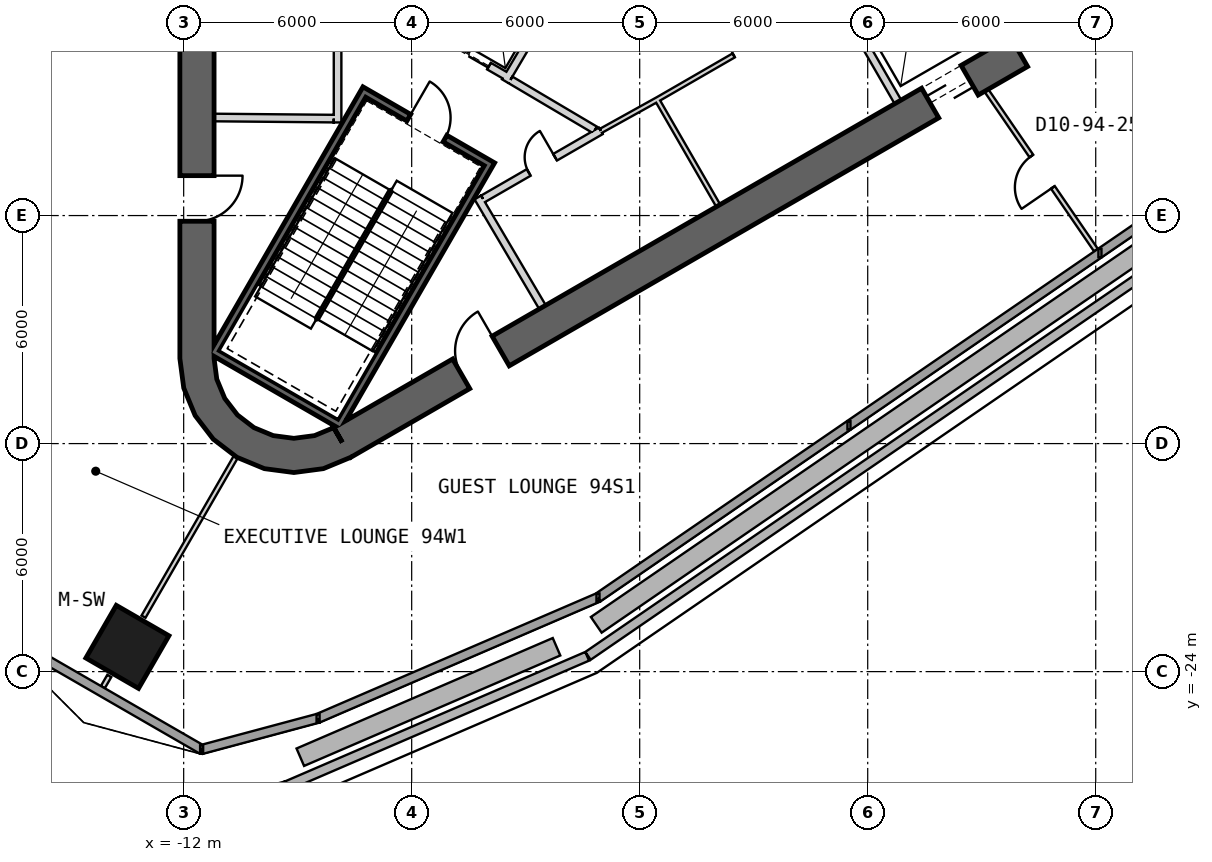
"""IFC4 building model, lengths in metres.
Left out: names, types, materials, properties, quantities, classifications, styles, units other than length and angle.
Written with IfcOpenShell. Run it as: python <this file> out.ifc"""

import sys

from ifc_helpers import new_model, si_unit, direction, frame, frame_2d, origin, origin_2d, place, context, subcontext, project, spatial, polyline, rectangle, outline, extrude, element, fill, save


model = new_model("IFC4")
c1 = context("Model", 3, precision=1e-05, world=origin(), true_north=direction((0.0, 1.0)))
c2 = subcontext(c1, "Body", "Model", "MODEL_VIEW")
j1 = project(units=[si_unit("LENGTHUNIT", "METRE"), si_unit("PLANEANGLEUNIT", "RADIAN")], contexts=[c1])
p1 = place(None, origin())
s1 = spatial("IfcSite", under=j1, at=p1, CompositionType="ELEMENT")
p2 = place(p1, origin())
s2 = spatial("IfcBuilding", under=s1, at=p2, CompositionType="ELEMENT")
p3 = place(p2, frame((0.0, 0.0, 415.3)))
s3 = spatial("IfcBuildingStorey", under=s2, at=p3, CompositionType="ELEMENT", Elevation=415.3)
p4 = place(p3, frame((-13.48, -23.349, -0.25), z_axis=(0.0, 0.0, 1.0), x_axis=(-0.5, -0.866025403784, 0.0)))
e1 = element("IfcColumn", 1, at=p4, inside=s3, PredefinedType="COLUMN", context=c2, shape_type="SweptSolid", body=[
    extrude(rectangle(XDim=1.6, YDim=1.6, at=origin_2d()), origin(), (0.0, 0.0, 1.0), 5.0),
])
p5 = place(p3, frame((-11.65, 15.762, 0.0), z_axis=(0.0, 0.0, 1.0), x_axis=(0.0, -1.0, 0.0)))
e2 = element("IfcWall", 2, at=p5, inside=s3, PredefinedType="SHEAR", context=c2, shape_type="SweptSolid", body=[
    extrude(rectangle(XDim=31.523, YDim=0.9, at=frame_2d((15.762, 0.0))), origin(), (0.0, 0.0, 1.0), 5.0),
])
p6 = place(p5, frame((3.612, 0.0, 0.0)))
e3 = element("IfcOpeningElement", 3, at=p6, cuts=e2, PredefinedType="OPENING", context=c2, shape_type="SweptSolid", body=[
    extrude(rectangle(XDim=1.2, YDim=2.4, at=frame_2d((0.6, 1.2))), frame((0.0, 0.46, 0.0), z_axis=(0.0, -1.0, 0.0), x_axis=(1.0, 0.0, 0.0)), (0.0, 0.0, 1.0), 0.92),
])
p7 = place(p5, frame((26.712, 0.0, 0.0)))
e4 = element("IfcOpeningElement", 4, at=p7, cuts=e2, PredefinedType="OPENING", context=c2, shape_type="SweptSolid", body=[
    extrude(rectangle(XDim=1.2, YDim=2.4, at=frame_2d((0.6, 1.2))), frame((0.0, 0.46, 0.0), z_axis=(0.0, -1.0, 0.0), x_axis=(1.0, 0.0, 0.0)), (0.0, 0.0, 1.0), 0.92),
])
p8 = place(p3, frame((-7.825, -17.97, 0.0), z_axis=(0.0, 0.0, 1.0), x_axis=(0.866028369851, 0.499994862586, 0.0)))
e5 = element("IfcWall", 5, at=p8, inside=s3, PredefinedType="SHEAR", context=c2, shape_type="SweptSolid", body=[
    extrude(rectangle(XDim=31.523, YDim=0.9, at=frame_2d((15.762, 0.0))), origin(), (0.0, 0.0, 1.0), 5.0),
])
p9 = place(p8, frame((17.862, 0.0, 0.0)))
e6 = element("IfcOpeningElement", 6, at=p9, cuts=e5, PredefinedType="OPENING", context=c2, shape_type="SweptSolid", body=[
    extrude(rectangle(XDim=1.2, YDim=2.4, at=frame_2d((0.6, 1.2))), frame((0.0, 0.46, 0.0), z_axis=(0.0, -1.0, 0.0), x_axis=(1.0, 0.0, 0.0)), (0.0, 0.0, 1.0), 0.92),
])
p10 = place(p8, frame((20.562, 0.0, 0.0)))
e7 = element("IfcOpeningElement", 7, at=p10, cuts=e5, PredefinedType="OPENING", context=c2, shape_type="SweptSolid", body=[
    extrude(rectangle(XDim=1.2, YDim=2.4, at=frame_2d((0.6, 1.2))), frame((0.0, 0.46, 0.0), z_axis=(0.0, -1.0, 0.0), x_axis=(1.0, 0.0, 0.0)), (0.0, 0.0, 1.0), 0.92),
])
p11 = place(p8, frame((26.712, 0.0, 0.0)))
e8 = element("IfcOpeningElement", 8, at=p11, cuts=e5, PredefinedType="OPENING", context=c2, shape_type="SweptSolid", body=[
    extrude(rectangle(XDim=1.2, YDim=2.4, at=frame_2d((0.6, 1.2))), frame((0.0, 0.46, 0.0), z_axis=(0.0, -1.0, 0.0), x_axis=(1.0, 0.0, 0.0)), (0.0, 0.0, 1.0), 0.92),
])
p12 = place(p8, frame((3.612, 0.0, 0.0)))
e9 = element("IfcOpeningElement", 9, at=p12, cuts=e5, PredefinedType="OPENING", context=c2, shape_type="SweptSolid", body=[
    extrude(rectangle(XDim=1.2, YDim=2.4, at=frame_2d((0.6, 1.2))), frame((0.0, 0.46, 0.0), z_axis=(0.0, -1.0, 0.0), x_axis=(1.0, 0.0, 0.0)), (0.0, 0.0, 1.0), 0.92),
])
p13 = place(p3, origin())
e10 = element("IfcWall", 10, at=p13, inside=s3, PredefinedType="SHEAR", context=c2, shape_type="SweptSolid", body=[
    extrude(outline(polyline([(-12.1, -15.762), (-11.998, -16.538), (-11.698, -17.262), (-11.221, -17.883), (-10.6, -18.36), (-9.876, -18.659), (-9.1, -18.762), (-8.323, -18.659), (-7.6, -18.36), (-8.05, -17.58), (-8.556, -17.79), (-9.1, -17.862), (-9.644, -17.79), (-10.15, -17.58), (-10.585, -17.247), (-10.919, -16.812), (-11.128, -16.305), (-11.2, -15.762), (-12.1, -15.762)])), origin(), (0.0, 0.0, 1.0), 5.0),
])
p14 = place(p3, frame((-16.795, -23.007, 0.0), z_axis=(0.0, 0.0, 1.0), x_axis=(0.866033863416, -0.499985347202, 0.0)))
e11 = element("IfcWall", 11, at=p14, inside=s3, PredefinedType="SOLIDWALL", context=c2, shape_type="SweptSolid", body=[
    extrude(rectangle(XDim=6.083, YDim=0.24, at=frame_2d((3.042, 0.0))), origin(), (0.0, 0.0, 1.0), 4.75),
])
p15 = place(p3, frame((-11.527, -26.048, 0.0), z_axis=(0.0, 0.0, 1.0), x_axis=(0.965940494045, 0.258764298086, 0.0)))
e12 = element("IfcWall", 12, at=p15, inside=s3, PredefinedType="SOLIDWALL", context=c2, shape_type="SweptSolid", body=[
    extrude(rectangle(XDim=3.172, YDim=0.24, at=frame_2d((1.586, 0.0))), origin(), (0.0, 0.0, 1.0), 4.75),
])
p16 = place(p3, frame((-8.463, -25.227, 0.0), z_axis=(0.0, 0.0, 1.0), x_axis=(0.918306915917, 0.395869180638, 0.0)))
e13 = element("IfcWall", 13, at=p16, inside=s3, PredefinedType="SOLIDWALL", context=c2, shape_type="SweptSolid", body=[
    extrude(rectangle(XDim=8.021, YDim=0.24, at=frame_2d((4.01, 0.0))), origin(), (0.0, 0.0, 1.0), 4.75),
])
p17 = place(p3, frame((-1.098, -22.052, 0.0), z_axis=(0.0, 0.0, 1.0), x_axis=(0.824476827337, 0.565895715821, 0.0)))
e14 = element("IfcWall", 14, at=p17, inside=s3, PredefinedType="SOLIDWALL", context=c2, shape_type="SweptSolid", body=[
    extrude(rectangle(XDim=24.031, YDim=0.24, at=frame_2d((12.016, 0.0))), origin(), (0.0, 0.0, 1.0), 4.75),
])
p18 = place(p3, frame((20.109, -8.849, 0.04), z_axis=(0.0, 0.0, 1.0), x_axis=(-0.824476642241, -0.565895985494, 0.0)))
e15 = element("IfcWall", 15, at=p18, inside=s3, PredefinedType="PARAPET", context=c2, shape_type="SweptSolid", body=[
    extrude(rectangle(XDim=26.04, YDim=0.25, at=frame_2d((13.02, 0.0))), origin(), (0.0, 0.0, 1.0), 1.2),
])
p19 = place(p3, frame((-1.382, -23.597, 0.04), z_axis=(0.0, 0.0, 1.0), x_axis=(-0.918307389255, -0.395868082622, 0.0)))
e16 = element("IfcWall", 16, at=p19, inside=s3, PredefinedType="PARAPET", context=c2, shape_type="SweptSolid", body=[
    extrude(rectangle(XDim=8.614, YDim=0.25, at=frame_2d((4.307, 0.0))), origin(), (0.0, 0.0, 1.0), 1.2),
])
p20 = place(p3, frame((-9.31, -27.013, 0.04), z_axis=(0.0, 0.0, 1.0), x_axis=(-0.965913407004, -0.258865390057, 0.0)))
e17 = element("IfcWall", 17, at=p20, inside=s3, PredefinedType="PARAPET", context=c2, shape_type="SweptSolid", body=[
    extrude(rectangle(XDim=3.272, YDim=0.25, at=frame_2d((1.636, 0.0))), origin(), (0.0, 0.0, 1.0), 1.2),
])
p21 = place(p3, frame((19.357, -8.698, 0.04), z_axis=(0.0, 0.0, 1.0), x_axis=(-0.824477152259, -0.565895242428, 0.0)))
e18 = element("IfcWall", 18, at=p21, inside=s3, PredefinedType="PARAPET", context=c2, shape_type="SweptSolid", body=[
    extrude(rectangle(XDim=24.864, YDim=0.5, at=frame_2d((12.432, 0.0))), origin(), (0.0, 0.0, 1.0), 0.6),
])
p22 = place(p3, frame((-2.188, -23.346, 0.04), z_axis=(0.0, 0.0, 1.0), x_axis=(-0.918305329137, -0.395872861507, 0.0)))
e19 = element("IfcWall", 19, at=p22, inside=s3, PredefinedType="PARAPET", context=c2, shape_type="SweptSolid", body=[
    extrude(rectangle(XDim=7.342, YDim=0.5, at=frame_2d((3.671, 0.0))), origin(), (0.0, 0.0, 1.0), 0.6),
])
p23 = place(p3, frame((6.795, -9.01, 0.0), z_axis=(0.0, 0.0, 1.0), x_axis=(-0.499984717929, 0.866034226713, 0.0)))
e20 = element("IfcWall", 20, at=p23, inside=s3, PredefinedType="PLUMBINGWALL", context=c2, shape_type="SweptSolid", body=[
    extrude(rectangle(XDim=3.25, YDim=0.2, at=frame_2d((1.625, 0.0))), origin(), (0.0, 0.0, 1.0), 4.75),
])
p24 = place(p3, frame((-3.905, -10.563, -0.25), z_axis=(0.0, 0.0, 1.0), x_axis=(-0.500012932018, -0.866017937352, 0.0)))
e21 = element("IfcWall", 21, at=p24, inside=s3, PredefinedType="SHEAR", context=c2, shape_type="SweptSolid", body=[
    extrude(rectangle(XDim=8.1, YDim=0.2, at=frame_2d((4.05, 0.0))), origin(), (0.0, 0.0, 1.0), 5.0),
])
p25 = place(p3, frame((-11.282, -15.541, -0.25), z_axis=(0.0, 0.0, 1.0), x_axis=(0.866000483506, -0.500043160704, 0.0)))
e22 = element("IfcWall", 22, at=p25, inside=s3, PredefinedType="SHEAR", context=c2, shape_type="SweptSolid", body=[
    extrude(rectangle(XDim=3.8, YDim=0.2, at=frame_2d((1.9, 0.0))), origin(), (0.0, 0.0, 1.0), 5.0),
])
p26 = place(p3, frame((-7.196, -8.663, -0.25), z_axis=(0.0, 0.0, 1.0), x_axis=(-0.499997992926, -0.866026562566, 0.0)))
e23 = element("IfcWall", 23, at=p26, inside=s3, PredefinedType="SHEAR", context=c2, shape_type="SweptSolid", body=[
    extrude(rectangle(XDim=7.9, YDim=0.2, at=frame_2d((3.95, 0.0))), origin(), (0.0, 0.0, 1.0), 5.0),
])
p27 = place(p3, frame((-4.041, -10.599, -0.25), z_axis=(0.0, 0.0, 1.0), x_axis=(-0.866047807691, 0.499961193289, 0.0)))
e24 = element("IfcWall", 24, at=p27, inside=s3, PredefinedType="SHEAR", context=c2, shape_type="SweptSolid", body=[
    extrude(rectangle(XDim=3.6, YDim=0.2, at=frame_2d((1.8, 0.0))), origin(), (0.0, 0.0, 1.0), 5.0),
])
p28 = place(p27, frame((1.25, 0.0, 0.25)))
e25 = element("IfcOpeningElement", 25, at=p28, cuts=e24, PredefinedType="OPENING", context=c2, shape_type="SweptSolid", body=[
    extrude(rectangle(XDim=1.1, YDim=2.1, at=frame_2d((0.55, 1.05))), frame((0.0, 0.11, 0.0), z_axis=(0.0, -1.0, 0.0), x_axis=(1.0, 0.0, 0.0)), (0.0, 0.0, 1.0), 0.22),
])
p29 = place(p3, frame((-3.446, -8.368, 0.0), z_axis=(0.0, 0.0, 1.0), x_axis=(-0.866024647952, 0.500001309137, 0.0)))
e26 = element("IfcWall", 26, at=p29, inside=s3, PredefinedType="PLUMBINGWALL", context=c2, shape_type="SweptSolid", body=[
    extrude(rectangle(XDim=2.4, YDim=0.2, at=frame_2d((1.2, 0.0))), origin(), (0.0, 0.0, 1.0), 4.75),
])
p30 = place(p29, frame((0.6, 0.0, 0.0)))
e27 = element("IfcOpeningElement", 27, at=p30, cuts=e26, PredefinedType="OPENING", context=c2, shape_type="SweptSolid", body=[
    extrude(rectangle(XDim=1.2, YDim=2.4, at=frame_2d((0.6, 1.2))), frame((0.0, 0.11, 0.0), z_axis=(0.0, -1.0, 0.0), x_axis=(1.0, 0.0, 0.0)), (0.0, 0.0, 1.0), 0.22),
])
p31 = place(p3, frame((-1.961, -5.796, 0.0), z_axis=(0.0, 0.0, 1.0), x_axis=(-0.508647062354, -0.860975125052, 0.0)))
e28 = element("IfcWall", 28, at=p31, inside=s3, PredefinedType="PLUMBINGWALL", context=c2, shape_type="SweptSolid", body=[
    extrude(rectangle(XDim=3.1, YDim=0.2, at=frame_2d((1.55, 0.0))), origin(), (0.0, 0.0, 1.0), 4.75),
])
p32 = place(p3, frame((-7.95, -9.55, 0.0), z_axis=(0.0, 0.0, 1.0), x_axis=(0.0, 1.0, 0.0)))
e29 = element("IfcWall", 29, at=p32, inside=s3, PredefinedType="PARTITIONING", context=c2, shape_type="SweptSolid", body=[
    extrude(rectangle(XDim=3.778, YDim=0.2, at=frame_2d((1.889, 0.0))), origin(), (0.0, 0.0, 1.0), 4.75),
])
p33 = place(p3, frame((-11.2, -9.42, 0.0), z_axis=(0.0, 0.0, 1.0), x_axis=(0.999957467379, -0.009222983926, 0.0)))
e30 = element("IfcWall", 30, at=p33, inside=s3, PredefinedType="PARTITIONING", context=c2, shape_type="SweptSolid", body=[
    extrude(rectangle(XDim=3.15, YDim=0.2, at=frame_2d((1.575, 0.0))), origin(), (0.0, 0.0, 1.0), 4.75),
])
p34 = place(p3, frame((2.067, -11.74, 0.0), z_axis=(0.0, 0.0, 1.0), x_axis=(-0.499984717929, 0.866034226713, 0.0)))
e31 = element("IfcWall", 31, at=p34, inside=s3, PredefinedType="PARTITIONING", context=c2, shape_type="SweptSolid", body=[
    extrude(rectangle(XDim=3.25, YDim=0.12, at=frame_2d((1.625, 0.0))), origin(), (0.0, 0.0, 1.0), 4.75),
])
p35 = place(p3, frame((-4.26, -11.524, 0.0), z_axis=(0.0, 0.0, 1.0), x_axis=(0.507997497166, -0.861358544901, 0.0)))
e32 = element("IfcWall", 32, at=p35, inside=s3, PredefinedType="PARTITIONING", context=c2, shape_type="SweptSolid", body=[
    extrude(rectangle(XDim=3.35, YDim=0.2, at=frame_2d((1.675, 0.0))), origin(), (0.0, 0.0, 1.0), 4.75),
])
p36 = place(p3, frame((-1.024, -9.771, 0.0), z_axis=(0.0, 0.0, 1.0), x_axis=(-0.866029903013, -0.499992207027, 0.0)))
e33 = element("IfcWall", 33, at=p36, inside=s3, PredefinedType="PARTITIONING", context=c2, shape_type="SweptSolid", body=[
    extrude(rectangle(XDim=3.578, YDim=0.2, at=frame_2d((1.789, 0.0))), origin(), (0.0, 0.0, 1.0), 4.75),
])
p37 = place(p36, frame((1.389, 0.0, 0.0)))
e34 = element("IfcOpeningElement", 34, at=p37, cuts=e33, PredefinedType="OPENING", context=c2, shape_type="SweptSolid", body=[
    extrude(rectangle(XDim=0.8, YDim=2.1, at=frame_2d((0.4, 1.05))), frame((0.0, 0.11, 0.0), z_axis=(0.0, -1.0, 0.0), x_axis=(1.0, 0.0, 0.0)), (0.0, 0.0, 1.0), 0.22),
])
p38 = place(p3, frame((-1.023, -9.772, 0.0), z_axis=(0.0, 0.0, 1.0), x_axis=(0.874290944206, 0.485402250592, 0.0)))
e35 = element("IfcWall", 35, at=p38, inside=s3, PredefinedType="PARTITIONING", context=c2, shape_type="SweptSolid", body=[
    extrude(rectangle(XDim=1.723, YDim=0.12, at=frame_2d((0.861, 0.0))), origin(), (0.0, 0.0, 1.0), 4.75),
])
p39 = place(p3, frame((0.483, -8.936, 0.0), z_axis=(0.0, 0.0, 1.0), x_axis=(0.866028230842, 0.499995103361, 0.0)))
e36 = element("IfcWall", 36, at=p39, inside=s3, PredefinedType="PARTITIONING", context=c2, shape_type="SweptSolid", body=[
    extrude(rectangle(XDim=5.4, YDim=0.12, at=frame_2d((2.7, 0.0))), origin(), (0.0, 0.0, 1.0), 4.75),
])
p40 = place(p39, frame((2.3, 0.0, 0.0)))
e37 = element("IfcOpeningElement", 37, at=p40, cuts=e36, PredefinedType="OPENING", context=c2, shape_type="SweptSolid", body=[
    extrude(rectangle(XDim=0.8, YDim=2.1, at=frame_2d((0.4, 1.05))), frame((0.0, 0.07, 0.0), z_axis=(0.0, -1.0, 0.0), x_axis=(1.0, 0.0, 0.0)), (0.0, 0.0, 1.0), 0.14),
])
p41 = place(p3, frame((-3.401, -8.43, 0.0), z_axis=(0.0, 0.0, 1.0), x_axis=(0.860630814782, -0.509229418482, 0.0)))
e38 = element("IfcWall", 38, at=p41, inside=s3, PredefinedType="PARTITIONING", context=c2, shape_type="SweptSolid", body=[
    extrude(rectangle(XDim=2.582, YDim=0.2, at=frame_2d((1.291, 0.0))), origin(), (0.0, 0.0, 1.0), 4.75),
])
p42 = place(p3, frame((-10.549, -18.212, 0.0), z_axis=(0.0, 0.0, 1.0), x_axis=(-0.500039923732, -0.86600235258, 0.0)))
e39 = element("IfcWall", 39, at=p42, inside=s3, PredefinedType="PARTITIONING", context=c2, shape_type="SweptSolid", body=[
    extrude(rectangle(XDim=5.015, YDim=0.12, at=frame_2d((2.507, 0.0))), origin(), (0.0, 0.0, 1.0), 2.52),
])
p43 = place(p3, frame((-13.957, -24.113, 0.0), z_axis=(0.0, 0.0, 1.0), x_axis=(-0.499681137129, -0.866209421097, 0.0)))
e40 = element("IfcWall", 40, at=p43, inside=s3, PredefinedType="PARTITIONING", context=c2, shape_type="SweptSolid", body=[
    extrude(rectangle(XDim=0.341, YDim=0.12, at=frame_2d((0.17, 0.0))), origin(), (0.0, 0.0, 1.0), 4.75),
])
p44 = place(p3, frame((12.004, -12.907, 0.0), z_axis=(0.0, 0.0, 1.0), x_axis=(-0.565849521663, 0.824508531693, 0.0)))
e41 = element("IfcWall", 41, at=p44, inside=s3, PredefinedType="PARTITIONING", context=c2, shape_type="SweptSolid", body=[
    extrude(rectangle(XDim=5.096, YDim=0.12, at=frame_2d((2.548, 0.0))), origin(), (0.0, 0.0, 1.0), 4.75),
])
p45 = place(p44, frame((2.0, 0.0, 0.0)))
e42 = element("IfcOpeningElement", 42, at=p45, cuts=e41, PredefinedType="OPENING", context=c2, shape_type="SweptSolid", body=[
    extrude(rectangle(XDim=1.0, YDim=2.1, at=frame_2d((0.5, 1.05))), frame((0.0, 0.07, 0.0), z_axis=(0.0, -1.0, 0.0), x_axis=(1.0, 0.0, 0.0)), (0.0, 0.0, 1.0), 0.14),
])
p46 = place(p28, origin())
e43 = element("IfcDoor", 43, at=p46, inside=s3, OperationType="SINGLE_SWING_RIGHT", PredefinedType="USERDEFINED", context=c2, shape_type="SweptSolid", body=[
    extrude(rectangle(XDim=1.1, YDim=2.1, at=frame_2d((0.55, 1.05))), frame((0.0, 0.025, 0.0), z_axis=(0.0, -1.0, 0.0), x_axis=(1.0, 0.0, 0.0)), (0.0, 0.0, 1.0), 0.05),
])
fill(e25, e43)
p47 = place(p30, origin())
e44 = element("IfcDoor", 44, at=p47, inside=s3, OperationType="SLIDING_TO_LEFT", PredefinedType="USERDEFINED", context=c2, shape_type="SweptSolid", body=[
    extrude(rectangle(XDim=1.2, YDim=2.4, at=frame_2d((0.6, 1.2))), frame((0.0, 0.025, 0.0), z_axis=(0.0, -1.0, 0.0), x_axis=(1.0, 0.0, 0.0)), (0.0, 0.0, 1.0), 0.05),
])
fill(e27, e44)
p48 = place(p37, origin())
e45 = element("IfcDoor", 45, at=p48, inside=s3, OperationType="SINGLE_SWING_LEFT", PredefinedType="USERDEFINED", context=c2, shape_type="SweptSolid", body=[
    extrude(rectangle(XDim=0.8, YDim=2.1, at=frame_2d((0.4, 1.05))), frame((0.0, 0.025, 0.0), z_axis=(0.0, -1.0, 0.0), x_axis=(1.0, 0.0, 0.0)), (0.0, 0.0, 1.0), 0.05),
])
fill(e34, e45)
p49 = place(p40, origin())
e46 = element("IfcDoor", 46, at=p49, inside=s3, OperationType="SINGLE_SWING_RIGHT", PredefinedType="USERDEFINED", context=c2, shape_type="SweptSolid", body=[
    extrude(rectangle(XDim=0.8, YDim=2.1, at=frame_2d((0.4, 1.05))), frame((0.0, 0.025, 0.0), z_axis=(0.0, -1.0, 0.0), x_axis=(1.0, 0.0, 0.0)), (0.0, 0.0, 1.0), 0.05),
])
fill(e37, e46)
p50 = place(p45, origin())
e47 = element("IfcDoor", 47, at=p50, inside=s3, OperationType="SINGLE_SWING_LEFT", PredefinedType="NOTDEFINED", context=c2, shape_type="SweptSolid", body=[
    extrude(rectangle(XDim=1.0, YDim=2.1, at=frame_2d((0.5, 1.05))), frame((0.0, 0.025, 0.0), z_axis=(0.0, -1.0, 0.0), x_axis=(1.0, 0.0, 0.0)), (0.0, 0.0, 1.0), 0.05),
])
fill(e42, e47)
p51 = place(p9, origin())
e48 = element("IfcDoor", 48, at=p51, inside=s3, OperationType="SLIDING_TO_LEFT", PredefinedType="USERDEFINED", context=c2, shape_type="SweptSolid", body=[
    extrude(rectangle(XDim=1.2, YDim=2.4, at=frame_2d((0.6, 1.2))), frame((0.0, 0.025, 0.0), z_axis=(0.0, -1.0, 0.0), x_axis=(1.0, 0.0, 0.0)), (0.0, 0.0, 1.0), 0.05),
])
fill(e6, e48)
p52 = place(p10, origin())
e49 = element("IfcDoor", 49, at=p52, inside=s3, OperationType="SLIDING_TO_LEFT", PredefinedType="USERDEFINED", context=c2, shape_type="SweptSolid", body=[
    extrude(rectangle(XDim=1.2, YDim=2.4, at=frame_2d((0.6, 1.2))), frame((0.0, 0.025, 0.0), z_axis=(0.0, -1.0, 0.0), x_axis=(1.0, 0.0, 0.0)), (0.0, 0.0, 1.0), 0.05),
])
fill(e7, e49)
p53 = place(p7, origin())
e50 = element("IfcDoor", 50, at=p53, inside=s3, OperationType="SINGLE_SWING_LEFT", PredefinedType="USERDEFINED", context=c2, shape_type="SweptSolid", body=[
    extrude(rectangle(XDim=1.2, YDim=2.4, at=frame_2d((0.6, 1.2))), frame((0.0, 0.025, 0.0), z_axis=(0.0, -1.0, 0.0), x_axis=(1.0, 0.0, 0.0)), (0.0, 0.0, 1.0), 0.05),
])
fill(e4, e50)
p54 = place(p12, origin())
e51 = element("IfcDoor", 51, at=p54, inside=s3, OperationType="SINGLE_SWING_RIGHT", PredefinedType="USERDEFINED", context=c2, shape_type="SweptSolid", body=[
    extrude(rectangle(XDim=1.2, YDim=2.4, at=frame_2d((0.6, 1.2))), frame((0.0, 0.025, 0.0), z_axis=(0.0, -1.0, 0.0), x_axis=(1.0, 0.0, 0.0)), (0.0, 0.0, 1.0), 0.05),
])
fill(e9, e51)
save(model, sys.argv[1])
